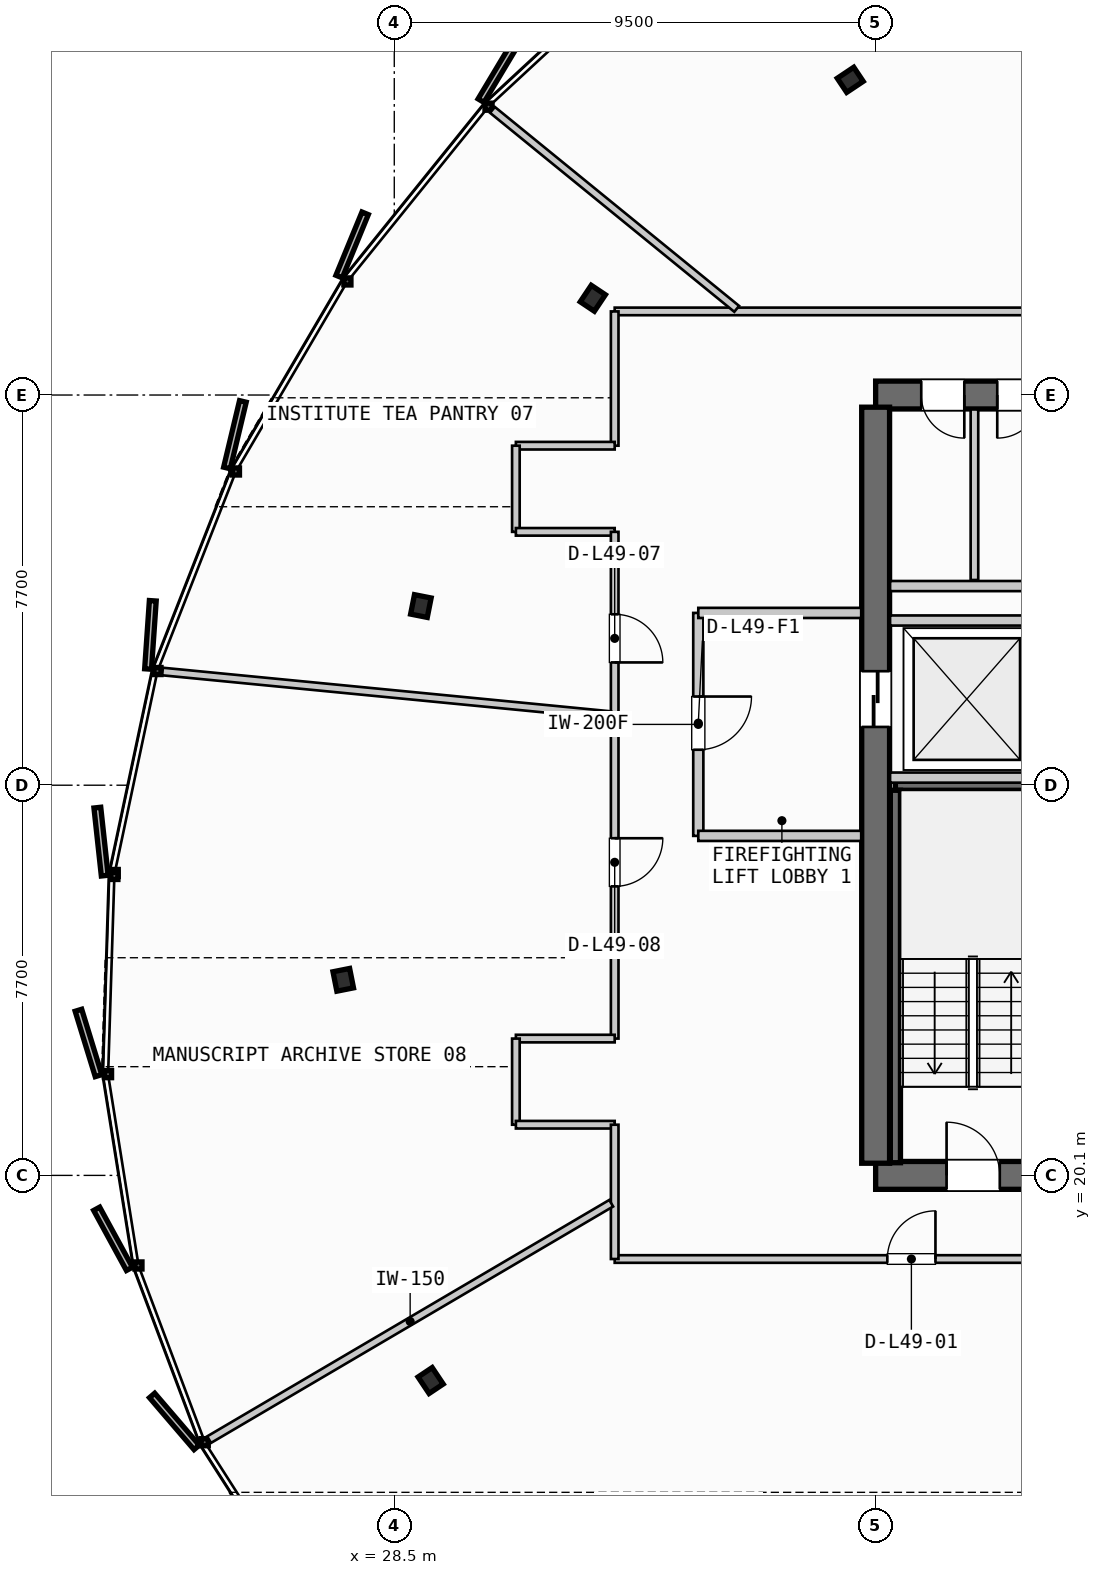
"""IFC4 building model, lengths in metres.
Left out: names, types, materials, properties, quantities, classifications, styles, units other than length and angle.
Written with IfcOpenShell. Run it as: python <this file> out.ifc"""

import sys

from ifc_helpers import new_model, si_unit, direction, frame, frame_2d, origin, origin_2d, place, context, subcontext, project, spatial, rectangle, i_section, extrude, source, transform, mapped, element, fill, save


model = new_model("IFC4")
c1 = context("Model", 3, precision=1e-05, world=origin(), true_north=direction((0.0, 1.0)))
c2 = subcontext(c1, "Body", "Model", "MODEL_VIEW")
j1 = project(units=[si_unit("LENGTHUNIT", "METRE"), si_unit("PLANEANGLEUNIT", "RADIAN")], contexts=[c1])
p1 = place(None, origin())
s1 = spatial("IfcSite", under=j1, at=p1, CompositionType="ELEMENT")
p2 = place(p1, origin())
s2 = spatial("IfcBuilding", under=s1, at=p2, CompositionType="ELEMENT")
p3 = place(p2, frame((0.0, 0.0, 190.4)))
s3 = spatial("IfcBuildingStorey", under=s2, at=p3, CompositionType="ELEMENT", Elevation=190.4)
p4 = place(p3, frame((38.0, 20.1, 0.0), z_axis=(0.0, 0.0, 1.0), x_axis=(1.0, 0.0, 0.0)))
e1 = element("IfcWall", 1, at=p4, inside=s3, PredefinedType="SHEAR", context=c2, shape_type="SweptSolid", body=[
    extrude(rectangle(XDim=17.6, YDim=0.55, at=frame_2d((8.8, 0.0))), origin(), (0.0, 0.0, 1.0), 3.26),
])
p5 = place(p4, frame((1.4, 0.0, 0.0)))
e2 = element("IfcOpeningElement", 2, at=p5, cuts=e1, PredefinedType="OPENING", context=c2, shape_type="SweptSolid", body=[
    extrude(rectangle(XDim=1.05, YDim=2.15, at=frame_2d((0.525, 1.075))), frame((0.0, 0.285, 0.0), z_axis=(0.0, -1.0, 0.0), x_axis=(1.0, 0.0, 0.0)), (0.0, 0.0, 1.0), 0.57),
])
p6 = place(p4, frame((15.15, 0.0, 0.0)))
e3 = element("IfcOpeningElement", 3, at=p6, cuts=e1, PredefinedType="OPENING", context=c2, shape_type="SweptSolid", body=[
    extrude(rectangle(XDim=1.05, YDim=2.15, at=frame_2d((0.525, 1.075))), frame((0.0, 0.285, 0.0), z_axis=(0.0, -1.0, 0.0), x_axis=(1.0, 0.0, 0.0)), (0.0, 0.0, 1.0), 0.57),
])
p7 = place(p4, frame((5.25, 0.0, 0.0)))
e4 = element("IfcOpeningElement", 4, at=p7, cuts=e1, PredefinedType="OPENING", context=c2, shape_type="SweptSolid", body=[
    extrude(rectangle(XDim=0.95, YDim=2.15, at=frame_2d((0.475, 1.075))), frame((0.0, 0.285, 0.0), z_axis=(0.0, -1.0, 0.0), x_axis=(1.0, 0.0, 0.0)), (0.0, 0.0, 1.0), 0.57),
])
p8 = place(p4, frame((11.4, 0.0, 0.0)))
e5 = element("IfcOpeningElement", 5, at=p8, cuts=e1, PredefinedType="OPENING", context=c2, shape_type="SweptSolid", body=[
    extrude(rectangle(XDim=0.95, YDim=2.15, at=frame_2d((0.475, 1.075))), frame((0.0, 0.285, 0.0), z_axis=(0.0, -1.0, 0.0), x_axis=(1.0, 0.0, 0.0)), (0.0, 0.0, 1.0), 0.57),
])
p9 = place(p3, frame((55.6, 35.5, 0.0), z_axis=(0.0, 0.0, 1.0), x_axis=(-1.0, 0.0, 0.0)))
e6 = element("IfcWall", 6, at=p9, inside=s3, PredefinedType="SHEAR", context=c2, shape_type="SweptSolid", body=[
    extrude(rectangle(XDim=17.6, YDim=0.55, at=frame_2d((8.8, 0.0))), origin(), (0.0, 0.0, 1.0), 3.26),
])
p10 = place(p9, frame((8.05, 0.0, 0.0)))
e7 = element("IfcOpeningElement", 7, at=p10, cuts=e6, PredefinedType="OPENING", context=c2, shape_type="SweptSolid", body=[
    extrude(rectangle(XDim=1.5, YDim=2.2, at=frame_2d((0.75, 1.1))), frame((0.0, 0.285, 0.0), z_axis=(0.0, -1.0, 0.0), x_axis=(1.0, 0.0, 0.0)), (0.0, 0.0, 1.0), 0.57),
])
p11 = place(p9, frame((15.85, 0.0, 0.0)))
e8 = element("IfcOpeningElement", 8, at=p11, cuts=e6, PredefinedType="OPENING", context=c2, shape_type="SweptSolid", body=[
    extrude(rectangle(XDim=0.85, YDim=2.15, at=frame_2d((0.425, 1.075))), frame((0.0, 0.285, 0.0), z_axis=(0.0, -1.0, 0.0), x_axis=(1.0, 0.0, 0.0)), (0.0, 0.0, 1.0), 0.57),
])
p12 = place(p9, frame((14.35, 0.0, 0.0)))
e9 = element("IfcOpeningElement", 9, at=p12, cuts=e6, PredefinedType="OPENING", context=c2, shape_type="SweptSolid", body=[
    extrude(rectangle(XDim=0.85, YDim=2.15, at=frame_2d((0.425, 1.075))), frame((0.0, 0.285, 0.0), z_axis=(0.0, -1.0, 0.0), x_axis=(1.0, 0.0, 0.0)), (0.0, 0.0, 1.0), 0.57),
])
p13 = place(p9, frame((12.3, 0.0, 0.0)))
e10 = element("IfcOpeningElement", 10, at=p13, cuts=e6, PredefinedType="OPENING", context=c2, shape_type="SweptSolid", body=[
    extrude(rectangle(XDim=0.95, YDim=2.15, at=frame_2d((0.475, 1.075))), frame((0.0, 0.285, 0.0), z_axis=(0.0, -1.0, 0.0), x_axis=(1.0, 0.0, 0.0)), (0.0, 0.0, 1.0), 0.57),
])
p14 = place(p9, frame((10.2, 0.0, 0.0)))
e11 = element("IfcOpeningElement", 11, at=p14, cuts=e6, PredefinedType="OPENING", context=c2, shape_type="SweptSolid", body=[
    extrude(rectangle(XDim=0.9, YDim=2.15, at=frame_2d((0.45, 1.075))), frame((0.0, 0.285, 0.0), z_axis=(0.0, -1.0, 0.0), x_axis=(1.0, 0.0, 0.0)), (0.0, 0.0, 1.0), 0.57),
])
p15 = place(p3, frame((38.0, 35.26, 0.0), z_axis=(0.0, 0.0, 1.0), x_axis=(0.0, -1.0, 0.0)))
e12 = element("IfcWall", 12, at=p15, inside=s3, PredefinedType="SHEAR", context=c2, shape_type="SweptSolid", body=[
    extrude(rectangle(XDim=14.92, YDim=0.55, at=frame_2d((7.46, 0.0))), origin(), (0.0, 0.0, 1.0), 3.26),
])
p16 = place(p15, frame((5.21, 0.0, 0.0)))
e13 = element("IfcOpeningElement", 13, at=p16, cuts=e12, PredefinedType="OPENING", context=c2, shape_type="SweptSolid", body=[
    extrude(rectangle(XDim=1.1, YDim=2.2, at=frame_2d((0.55, 1.1))), frame((0.0, 0.285, 0.0), z_axis=(0.0, -1.0, 0.0), x_axis=(1.0, 0.0, 0.0)), (0.0, 0.0, 1.0), 0.57),
])
m1 = source(origin(), c2, "Body", "SweptSolid", [
    extrude(i_section(OverallWidth=0.391, OverallDepth=0.335, WebThickness=0.023, FlangeThickness=0.034, FilletRadius=0.015, at=origin_2d()), origin(), (0.0, 0.0, 1.0), 3.26),
])
for number, where, z_axis, x_axis in (
    (14, (37.499, 41.72, 0.0), (0.0, 0.0, 1.0), (-0.556, 0.831, 0.0)),
    (15, (32.418, 37.409, 0.0), (0.0, 0.0, 1.0), (-0.831, 0.556, 0.0)),
    (16, (29.025, 31.336, 0.0), (0.0, 0.0, 1.0), (-0.981, 0.195, 0.0)),
    (17, (27.493, 23.96, 0.0), (0.0, 0.0, 1.0), (-0.981, -0.195, 0.0)),
    (18, (29.218, 16.052, 0.0), (0.0, 0.0, 1.0), (-0.831, -0.556, 0.0)),
):
    element("IfcColumn", number, at=place(p3, frame(where, z_axis=z_axis, x_axis=x_axis)), inside=s3, PredefinedType="COLUMN", context=c2, shape_type="MappedRepresentation", body=[
        mapped(m1, transform((0.0, 0.0, 0.0), scale=1.0)),
    ])
p17 = place(p3, frame((38.39, 27.8, 0.0), z_axis=(0.0, 0.0, 1.0), x_axis=(1.0, 0.0, 0.0)))
e19 = element("IfcWall", 19, at=p17, inside=s3, PredefinedType="SHEAR", context=c2, shape_type="SweptSolid", body=[
    extrude(rectangle(XDim=3.06, YDim=0.2, at=frame_2d((1.53, 0.0))), origin(), (0.0, 0.0, 1.0), 3.26),
])
p18 = place(p3, frame((38.39, 20.35, 0.0), z_axis=(0.0, 0.0, 1.0), x_axis=(0.0, 1.0, 0.0)))
e20 = element("IfcWall", 20, at=p18, inside=s3, PredefinedType="SHEAR", context=c2, shape_type="SweptSolid", body=[
    extrude(rectangle(XDim=7.35, YDim=0.2, at=frame_2d((3.675, 0.0))), origin(), (0.0, 0.0, 1.0), 3.26),
])
for number, where, z_axis, x_axis in (
    (21, (38.285, 27.95, 0.0), (0.0, 0.0, 1.0), (1.0, 0.0, 0.0)),
    (22, (38.285, 31.05, 0.0), (0.0, 0.0, 1.0), (1.0, 0.0, 0.0)),
):
    element("IfcWall", number, at=place(p3, frame(where, z_axis=z_axis, x_axis=x_axis)), inside=s3, PredefinedType="PARTITIONING", context=c2, shape_type="SweptSolid", body=[
        extrude(rectangle(XDim=2.865, YDim=0.2, at=frame_2d((1.433, 0.0))), origin(), (0.0, 0.0, 1.0), 2.735),
    ])
p19 = place(p3, frame((34.5, 31.2, 0.0), z_axis=(0.0, 0.0, 1.0), x_axis=(0.0, -1.0, 0.0)))
e23 = element("IfcWall", 23, at=p19, inside=s3, PredefinedType="PARTITIONING", context=c2, shape_type="SweptSolid", body=[
    extrude(rectangle(XDim=4.4, YDim=0.2, at=frame_2d((2.2, 0.0))), origin(), (0.0, 0.0, 1.0), 2.735),
])
p20 = place(p19, frame((1.65, 0.0, 0.0)))
e24 = element("IfcOpeningElement", 24, at=p20, cuts=e23, PredefinedType="OPENING", context=c2, shape_type="SweptSolid", body=[
    extrude(rectangle(XDim=1.05, YDim=2.15, at=frame_2d((0.525, 1.075))), frame((0.0, 0.11, 0.0), z_axis=(0.0, -1.0, 0.0), x_axis=(1.0, 0.0, 0.0)), (0.0, 0.0, 1.0), 0.22),
])
for number, where, z_axis, x_axis in (
    (25, (34.5, 26.8, 0.0), (0.0, 0.0, 1.0), (1.0, 0.0, 0.0)),
    (26, (34.5, 31.2, 0.0), (0.0, 0.0, 1.0), (1.0, 0.0, 0.0)),
):
    element("IfcWall", number, at=place(p3, frame(where, z_axis=z_axis, x_axis=x_axis)), inside=s3, PredefinedType="PARTITIONING", context=c2, shape_type="SweptSolid", body=[
        extrude(rectangle(XDim=3.215, YDim=0.2, at=frame_2d((1.607, 0.0))), origin(), (0.0, 0.0, 1.0), 2.735),
    ])
p21 = place(p3, frame((38.285, 31.73, 0.0), z_axis=(0.0, 0.0, 1.0), x_axis=(1.0, 0.0, 0.0)))
e27 = element("IfcWall", 27, at=p21, inside=s3, PredefinedType="PARTITIONING", context=c2, shape_type="SweptSolid", body=[
    extrude(rectangle(XDim=7.515, YDim=0.2, at=frame_2d((3.758, 0.0))), origin(), (0.0, 0.0, 1.0), 2.735),
])
p22 = place(p3, frame((39.95, 31.85, 0.0), z_axis=(0.0, 0.0, 1.0), x_axis=(0.0, 1.0, 0.0)))
e28 = element("IfcWall", 28, at=p22, inside=s3, PredefinedType="PARTITIONING", context=c2, shape_type="SweptSolid", body=[
    extrude(rectangle(XDim=3.365, YDim=0.15, at=frame_2d((1.683, 0.0))), origin(), (0.0, 0.0, 1.0), 2.735),
])
p23 = place(p3, frame((32.85, 18.45, 0.0), z_axis=(0.0, 0.0, 1.0), x_axis=(1.0, 0.0, 0.0)))
e29 = element("IfcWall", 29, at=p23, inside=s3, PredefinedType="PARTITIONING", context=c2, shape_type="SweptSolid", body=[
    extrude(rectangle(XDim=28.35, YDim=0.15, at=frame_2d((14.175, 0.0))), origin(), (0.0, 0.0, 1.0), 2.735),
])
p24 = place(p23, frame((5.381, 0.0, 0.0)))
e30 = element("IfcOpeningElement", 30, at=p24, cuts=e29, PredefinedType="OPENING", context=c2, shape_type="SweptSolid", body=[
    extrude(rectangle(XDim=0.95, YDim=2.15, at=frame_2d((0.475, 1.075))), frame((0.0, 0.085, 0.0), z_axis=(0.0, -1.0, 0.0), x_axis=(1.0, 0.0, 0.0)), (0.0, 0.0, 1.0), 0.17),
])
p25 = place(p23, frame((18.969, 0.0, 0.0)))
e31 = element("IfcOpeningElement", 31, at=p25, cuts=e29, PredefinedType="OPENING", context=c2, shape_type="SweptSolid", body=[
    extrude(rectangle(XDim=0.95, YDim=2.15, at=frame_2d((0.475, 1.075))), frame((0.0, 0.085, 0.0), z_axis=(0.0, -1.0, 0.0), x_axis=(1.0, 0.0, 0.0)), (0.0, 0.0, 1.0), 0.17),
])
p26 = place(p3, frame((61.2, 37.15, 0.0), z_axis=(0.0, 0.0, 1.0), x_axis=(-1.0, 0.0, 0.0)))
e32 = element("IfcWall", 32, at=p26, inside=s3, PredefinedType="PARTITIONING", context=c2, shape_type="SweptSolid", body=[
    extrude(rectangle(XDim=28.35, YDim=0.15, at=frame_2d((14.175, 0.0))), origin(), (0.0, 0.0, 1.0), 2.735),
])
p27 = place(p26, frame((5.451, 0.0, 0.0)))
e33 = element("IfcOpeningElement", 33, at=p27, cuts=e32, PredefinedType="OPENING", context=c2, shape_type="SweptSolid", body=[
    extrude(rectangle(XDim=0.95, YDim=2.15, at=frame_2d((0.475, 1.075))), frame((0.0, 0.085, 0.0), z_axis=(0.0, -1.0, 0.0), x_axis=(1.0, 0.0, 0.0)), (0.0, 0.0, 1.0), 0.17),
])
p28 = place(p26, frame((18.176, 0.0, 0.0)))
e34 = element("IfcOpeningElement", 34, at=p28, cuts=e32, PredefinedType="OPENING", context=c2, shape_type="SweptSolid", body=[
    extrude(rectangle(XDim=0.95, YDim=2.15, at=frame_2d((0.475, 1.075))), frame((0.0, 0.085, 0.0), z_axis=(0.0, -1.0, 0.0), x_axis=(1.0, 0.0, 0.0)), (0.0, 0.0, 1.0), 0.17),
])
p29 = place(p3, frame((32.85, 37.15, 0.0), z_axis=(0.0, 0.0, 1.0), x_axis=(0.0, -1.0, 0.0)))
e35 = element("IfcWall", 35, at=p29, inside=s3, PredefinedType="PARTITIONING", context=c2, shape_type="SweptSolid", body=[
    extrude(rectangle(XDim=2.65, YDim=0.15, at=frame_2d((1.325, 0.0))), origin(), (0.0, 0.0, 1.0), 2.735),
])
p30 = place(p3, frame((32.85, 34.5, 0.0), z_axis=(0.0, 0.0, 1.0), x_axis=(-1.0, 0.0, 0.0)))
e36 = element("IfcWall", 36, at=p30, inside=s3, PredefinedType="PARTITIONING", context=c2, shape_type="SweptSolid", body=[
    extrude(rectangle(XDim=1.95, YDim=0.15, at=frame_2d((0.975, 0.0))), origin(), (0.0, 0.0, 1.0), 2.735),
])
p31 = place(p3, frame((30.9, 34.5, 0.0), z_axis=(0.0, 0.0, 1.0), x_axis=(0.0, -1.0, 0.0)))
e37 = element("IfcWall", 37, at=p31, inside=s3, PredefinedType="PARTITIONING", context=c2, shape_type="SweptSolid", body=[
    extrude(rectangle(XDim=1.7, YDim=0.15, at=frame_2d((0.85, 0.0))), origin(), (0.0, 0.0, 1.0), 2.735),
])
p32 = place(p3, frame((30.9, 32.8, 0.0), z_axis=(0.0, 0.0, 1.0), x_axis=(1.0, 0.0, 0.0)))
e38 = element("IfcWall", 38, at=p32, inside=s3, PredefinedType="PARTITIONING", context=c2, shape_type="SweptSolid", body=[
    extrude(rectangle(XDim=1.95, YDim=0.15, at=frame_2d((0.975, 0.0))), origin(), (0.0, 0.0, 1.0), 2.735),
])
p33 = place(p3, frame((32.85, 32.8, 0.0), z_axis=(0.0, 0.0, 1.0), x_axis=(0.0, -1.0, 0.0)))
e39 = element("IfcWall", 39, at=p33, inside=s3, PredefinedType="PARTITIONING", context=c2, shape_type="SweptSolid", body=[
    extrude(rectangle(XDim=10.0, YDim=0.15, at=frame_2d((5.0, 0.0))), origin(), (0.0, 0.0, 1.0), 2.735),
])
p34 = place(p33, frame((1.627, 0.0, 0.0)))
e40 = element("IfcOpeningElement", 40, at=p34, cuts=e39, PredefinedType="OPENING", context=c2, shape_type="SweptSolid", body=[
    extrude(rectangle(XDim=0.95, YDim=2.15, at=frame_2d((0.475, 1.075))), frame((0.0, 0.085, 0.0), z_axis=(0.0, -1.0, 0.0), x_axis=(1.0, 0.0, 0.0)), (0.0, 0.0, 1.0), 0.17),
])
p35 = place(p33, frame((6.046, 0.0, 0.0)))
e41 = element("IfcOpeningElement", 41, at=p35, cuts=e39, PredefinedType="OPENING", context=c2, shape_type="SweptSolid", body=[
    extrude(rectangle(XDim=0.95, YDim=2.15, at=frame_2d((0.475, 1.075))), frame((0.0, 0.085, 0.0), z_axis=(0.0, -1.0, 0.0), x_axis=(1.0, 0.0, 0.0)), (0.0, 0.0, 1.0), 0.17),
])
p36 = place(p3, frame((32.85, 22.8, 0.0), z_axis=(0.0, 0.0, 1.0), x_axis=(-1.0, 0.0, 0.0)))
e42 = element("IfcWall", 42, at=p36, inside=s3, PredefinedType="PARTITIONING", context=c2, shape_type="SweptSolid", body=[
    extrude(rectangle(XDim=1.95, YDim=0.15, at=frame_2d((0.975, 0.0))), origin(), (0.0, 0.0, 1.0), 2.735),
])
p37 = place(p3, frame((30.9, 22.8, 0.0), z_axis=(0.0, 0.0, 1.0), x_axis=(0.0, -1.0, 0.0)))
e43 = element("IfcWall", 43, at=p37, inside=s3, PredefinedType="PARTITIONING", context=c2, shape_type="SweptSolid", body=[
    extrude(rectangle(XDim=1.7, YDim=0.15, at=frame_2d((0.85, 0.0))), origin(), (0.0, 0.0, 1.0), 2.735),
])
p38 = place(p3, frame((30.9, 21.1, 0.0), z_axis=(0.0, 0.0, 1.0), x_axis=(1.0, 0.0, 0.0)))
e44 = element("IfcWall", 44, at=p38, inside=s3, PredefinedType="PARTITIONING", context=c2, shape_type="SweptSolid", body=[
    extrude(rectangle(XDim=1.95, YDim=0.15, at=frame_2d((0.975, 0.0))), origin(), (0.0, 0.0, 1.0), 2.735),
])
p39 = place(p3, frame((32.85, 21.1, 0.0), z_axis=(0.0, 0.0, 1.0), x_axis=(0.0, -1.0, 0.0)))
e45 = element("IfcWall", 45, at=p39, inside=s3, PredefinedType="PARTITIONING", context=c2, shape_type="SweptSolid", body=[
    extrude(rectangle(XDim=2.65, YDim=0.15, at=frame_2d((1.325, 0.0))), origin(), (0.0, 0.0, 1.0), 2.735),
])
p40 = place(p3, frame((32.781, 19.551, 0.0), z_axis=(0.0, 0.0, 1.0), x_axis=(-0.862066458286, -0.506795246129, 0.0)))
e46 = element("IfcWall", 46, at=p40, inside=s3, PredefinedType="PARTITIONING", context=c2, shape_type="SweptSolid", body=[
    extrude(rectangle(XDim=9.205, YDim=0.15, at=frame_2d((4.603, 0.0))), origin(), (0.0, 0.0, 1.0), 2.735),
])
p41 = place(p3, frame((43.958, 18.374, 0.0), z_axis=(0.0, 0.0, 1.0), x_axis=(-0.290720609317, -0.956807988741, 0.0)))
e47 = element("IfcWall", 47, at=p41, inside=s3, PredefinedType="PARTITIONING", context=c2, shape_type="SweptSolid", body=[
    extrude(rectangle(XDim=13.945, YDim=0.15, at=frame_2d((6.973, 0.0))), origin(), (0.0, 0.0, 1.0), 2.735),
])
p42 = place(p3, frame((35.258, 37.2, 0.0), z_axis=(0.0, 0.0, 1.0), x_axis=(-0.775328994429, 0.631557559054, 0.0)))
e48 = element("IfcWall", 48, at=p42, inside=s3, PredefinedType="PARTITIONING", context=c2, shape_type="SweptSolid", body=[
    extrude(rectangle(XDim=6.217, YDim=0.15, at=frame_2d((3.108, 0.0))), origin(), (0.0, 0.0, 1.0), 2.735),
])
p43 = place(p3, frame((32.771, 29.184, 0.0), z_axis=(0.0, 0.0, 1.0), x_axis=(-0.995304441714, 0.096793947666, 0.0)))
e49 = element("IfcWall", 49, at=p43, inside=s3, PredefinedType="PARTITIONING", context=c2, shape_type="SweptSolid", body=[
    extrude(rectangle(XDim=8.886, YDim=0.15, at=frame_2d((4.443, 0.0))), origin(), (0.0, 0.0, 1.0), 2.735),
])
m2 = source(origin(), c2, "Body", "SweptSolid", [
    extrude(rectangle(XDim=1.05, YDim=2.15, at=frame_2d((0.525, 1.075))), frame((0.0, 0.025, 0.0), z_axis=(0.0, -1.0, 0.0), x_axis=(1.0, 0.0, 0.0)), (0.0, 0.0, 1.0), 0.05),
])
p44 = place(p5, origin())
e50 = element("IfcDoor", 50, at=p44, inside=s3, OperationType="SINGLE_SWING_LEFT", PredefinedType="DOOR", context=c2, shape_type="MappedRepresentation", body=[
    mapped(m2, transform((0.0, 0.0, 0.0), scale=1.0)),
])
fill(e2, e50)
m3 = source(origin(), c2, "Body", "SweptSolid", [
    extrude(rectangle(XDim=1.1, YDim=2.2, at=frame_2d((0.55, 1.1))), frame((0.0, 0.025, 0.0), z_axis=(0.0, -1.0, 0.0), x_axis=(1.0, 0.0, 0.0)), (0.0, 0.0, 1.0), 0.05),
])
p45 = place(p16, origin())
e51 = element("IfcDoor", 51, at=p45, inside=s3, OperationType="SLIDING_TO_LEFT", PredefinedType="DOOR", context=c2, shape_type="MappedRepresentation", body=[
    mapped(m3, transform((0.0, 0.0, 0.0), scale=1.0)),
])
fill(e13, e51)
m4 = source(origin(), c2, "Body", "SweptSolid", [
    extrude(rectangle(XDim=0.85, YDim=2.15, at=frame_2d((0.425, 1.075))), frame((0.0, 0.025, 0.0), z_axis=(0.0, -1.0, 0.0), x_axis=(1.0, 0.0, 0.0)), (0.0, 0.0, 1.0), 0.05),
])
p46 = place(p11, origin())
e52 = element("IfcDoor", 52, at=p46, inside=s3, OperationType="SINGLE_SWING_LEFT", PredefinedType="DOOR", context=c2, shape_type="MappedRepresentation", body=[
    mapped(m4, transform((0.0, 0.0, 0.0), scale=1.0)),
])
fill(e8, e52)
p47 = place(p12, origin())
e53 = element("IfcDoor", 53, at=p47, inside=s3, OperationType="SINGLE_SWING_RIGHT", PredefinedType="DOOR", context=c2, shape_type="MappedRepresentation", body=[
    mapped(m4, transform((0.0, 0.0, 0.0), scale=1.0)),
])
fill(e9, e53)
p48 = place(p20, origin())
e54 = element("IfcDoor", 54, at=p48, inside=s3, OperationType="SINGLE_SWING_LEFT", PredefinedType="DOOR", context=c2, shape_type="MappedRepresentation", body=[
    mapped(m2, transform((0.0, 0.0, 0.0), scale=1.0)),
])
fill(e24, e54)
m5 = source(origin(), c2, "Body", "SweptSolid", [
    extrude(rectangle(XDim=0.95, YDim=2.15, at=frame_2d((0.475, 1.075))), frame((0.0, 0.025, 0.0), z_axis=(0.0, -1.0, 0.0), x_axis=(1.0, 0.0, 0.0)), (0.0, 0.0, 1.0), 0.05),
])
p49 = place(p24, origin())
e55 = element("IfcDoor", 55, at=p49, inside=s3, OperationType="SINGLE_SWING_RIGHT", PredefinedType="DOOR", context=c2, shape_type="MappedRepresentation", body=[
    mapped(m5, transform((0.0, 0.0, 0.0), scale=1.0)),
])
fill(e30, e55)
p50 = place(p34, origin())
e56 = element("IfcDoor", 56, at=p50, inside=s3, OperationType="SINGLE_SWING_RIGHT", PredefinedType="DOOR", context=c2, shape_type="MappedRepresentation", body=[
    mapped(m5, transform((0.0, 0.0, 0.0), scale=1.0)),
])
fill(e40, e56)
p51 = place(p35, origin())
e57 = element("IfcDoor", 57, at=p51, inside=s3, OperationType="SINGLE_SWING_LEFT", PredefinedType="DOOR", context=c2, shape_type="MappedRepresentation", body=[
    mapped(m5, transform((0.0, 0.0, 0.0), scale=1.0)),
])
fill(e41, e57)
save(model, sys.argv[1])
